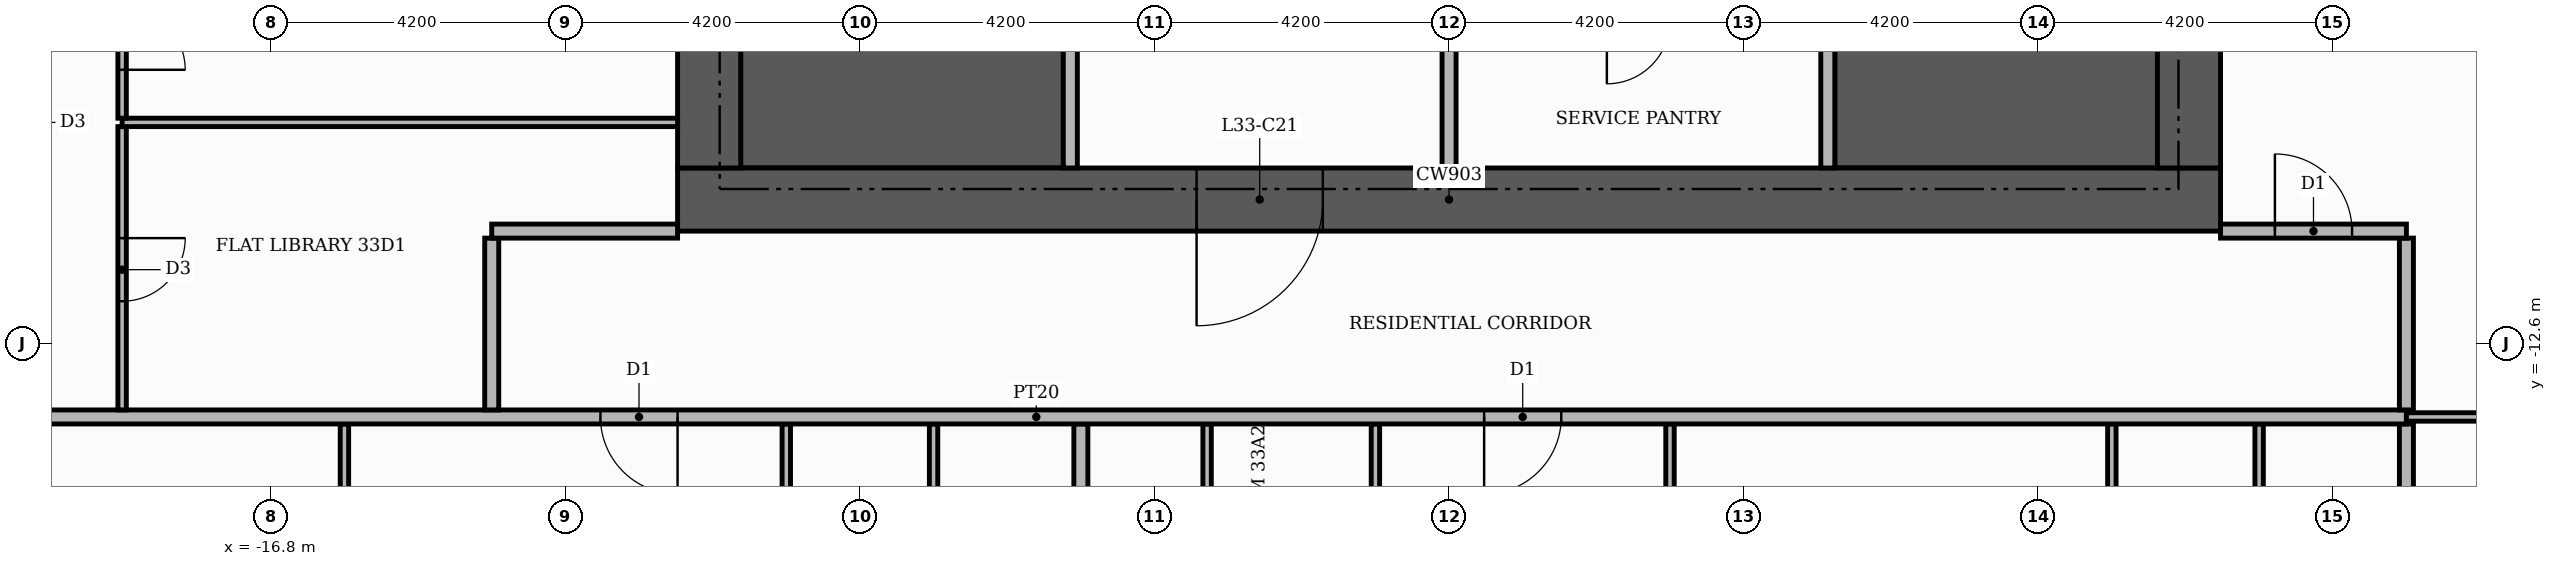
"""IFC4 building model, lengths in metres.
Left out: names, types, materials, properties, quantities, classifications, styles, units other than length and angle.
Written with IfcOpenShell. Run it as: python <this file> out.ifc"""

import sys

from ifc_helpers import new_model, si_unit, direction, frame, frame_2d, origin, place, context, subcontext, project, spatial, rectangle, extrude, element, fill, save


model = new_model("IFC4")
c1 = context("Model", 3, precision=1e-05, world=origin(), true_north=direction((0.0, 1.0)))
c2 = subcontext(c1, "Body", "Model", "MODEL_VIEW")
j1 = project(units=[si_unit("LENGTHUNIT", "METRE"), si_unit("PLANEANGLEUNIT", "RADIAN")], contexts=[c1])
p1 = place(None, origin())
s1 = spatial("IfcSite", under=j1, at=p1, CompositionType="ELEMENT")
p2 = place(p1, origin())
s2 = spatial("IfcBuilding", under=s1, at=p2, CompositionType="ELEMENT")
p3 = place(p2, frame((0.0, 0.0, 141.6)))
s3 = spatial("IfcBuildingStorey", under=s2, at=p3, CompositionType="ELEMENT", Elevation=141.6)
for number, where, z_axis, x_axis in (
    (1, (-10.1, -9.15, 0.0), (0.0, 0.0, 1.0), (1.0, 0.0, 0.0)),
    (2, (5.5, -9.15, 0.0), (0.0, 0.0, 1.0), (1.0, 0.0, 0.0)),
):
    element("IfcWall", number, at=place(p3, frame(where, z_axis=z_axis, x_axis=x_axis)), inside=s3, PredefinedType="SHEAR", context=c2, shape_type="SweptSolid", body=[
        extrude(rectangle(XDim=4.6, YDim=1.9, at=frame_2d((2.3, 0.0))), origin(), (0.0, 0.0, 1.0), 3.48),
    ])
p4 = place(p3, frame((-11.0, -10.55, 0.0), z_axis=(0.0, 0.0, 1.0), x_axis=(1.0, 0.0, 0.0)))
e3 = element("IfcWall", 3, at=p4, inside=s3, PredefinedType="SHEAR", context=c2, shape_type="SweptSolid", body=[
    extrude(rectangle(XDim=22.0, YDim=0.9, at=frame_2d((11.0, 0.0))), origin(), (0.0, 0.0, 1.0), 3.48),
])
p5 = place(p4, frame((7.4, 0.0, 0.0)))
e4 = element("IfcOpeningElement", 4, at=p5, cuts=e3, PredefinedType="OPENING", context=c2, shape_type="SweptSolid", body=[
    extrude(rectangle(XDim=1.8, YDim=2.2, at=frame_2d((0.9, 1.1))), frame((0.0, 0.46, 0.0), z_axis=(0.0, -1.0, 0.0), x_axis=(1.0, 0.0, 0.0)), (0.0, 0.0, 1.0), 0.92),
])
for number, where, z_axis, x_axis in (
    (5, (-10.55, -10.1, 0.0), (0.0, 0.0, 1.0), (0.0, 1.0, 0.0)),
    (6, (10.55, -10.1, 0.0), (0.0, 0.0, 1.0), (0.0, 1.0, 0.0)),
):
    element("IfcWall", number, at=place(p3, frame(where, z_axis=z_axis, x_axis=x_axis)), inside=s3, PredefinedType="SHEAR", context=c2, shape_type="SweptSolid", body=[
        extrude(rectangle(XDim=20.2, YDim=0.9, at=frame_2d((10.1, 0.0))), origin(), (0.0, 0.0, 1.0), 3.48),
    ])
p6 = place(p3, frame((-5.4, -10.1, 0.0), z_axis=(0.0, 0.0, 1.0), x_axis=(0.0, 1.0, 0.0)))
e7 = element("IfcWall", 7, at=p6, inside=s3, PredefinedType="PARTITIONING", context=c2, shape_type="SweptSolid", body=[
    extrude(rectangle(XDim=4.6, YDim=0.2, at=frame_2d((2.3, 0.0))), origin(), (0.0, 0.0, 1.0), 3.48),
])
p7 = place(p6, frame((2.9, 0.0, 0.0)))
e8 = element("IfcOpeningElement", 8, at=p7, cuts=e7, PredefinedType="OPENING", context=c2, shape_type="SweptSolid", body=[
    extrude(rectangle(XDim=1.0, YDim=2.1, at=frame_2d((0.5, 1.05))), frame((0.0, 0.11, 0.0), z_axis=(0.0, -1.0, 0.0), x_axis=(1.0, 0.0, 0.0)), (0.0, 0.0, 1.0), 0.22),
])
p8 = place(p3, frame((0.0, -10.1, 0.0), z_axis=(0.0, 0.0, 1.0), x_axis=(0.0, 1.0, 0.0)))
e9 = element("IfcWall", 9, at=p8, inside=s3, PredefinedType="PARTITIONING", context=c2, shape_type="SweptSolid", body=[
    extrude(rectangle(XDim=2.2, YDim=0.2, at=frame_2d((1.1, 0.0))), origin(), (0.0, 0.0, 1.0), 3.48),
])
p9 = place(p3, frame((5.4, -10.1, 0.0), z_axis=(0.0, 0.0, 1.0), x_axis=(0.0, 1.0, 0.0)))
e10 = element("IfcWall", 10, at=p9, inside=s3, PredefinedType="PARTITIONING", context=c2, shape_type="SweptSolid", body=[
    extrude(rectangle(XDim=4.6, YDim=0.2, at=frame_2d((2.3, 0.0))), origin(), (0.0, 0.0, 1.0), 3.48),
])
p10 = place(p9, frame((2.9, 0.0, 0.0)))
e11 = element("IfcOpeningElement", 11, at=p10, cuts=e10, PredefinedType="OPENING", context=c2, shape_type="SweptSolid", body=[
    extrude(rectangle(XDim=1.0, YDim=2.1, at=frame_2d((0.5, 1.05))), frame((0.0, 0.11, 0.0), z_axis=(0.0, -1.0, 0.0), x_axis=(1.0, 0.0, 0.0)), (0.0, 0.0, 1.0), 0.22),
])
for number, where, z_axis, x_axis in (
    (12, (-5.25, -25.42, 0.0), (0.0, 0.0, 1.0), (0.0, 1.0, 0.0)),
    (13, (13.65, -25.42, 0.0), (0.0, 0.0, 1.0), (0.0, 1.0, 0.0)),
):
    element("IfcWall", number, at=place(p3, frame(where, z_axis=z_axis, x_axis=x_axis)), inside=s3, PredefinedType="PARTITIONING", context=c2, shape_type="SweptSolid", body=[
        extrude(rectangle(XDim=11.67, YDim=0.2, at=frame_2d((5.835, 0.0))), origin(), (0.0, 0.0, 1.0), 3.48),
    ])
p11 = place(p3, frame((-15.75, -19.76, 0.0), z_axis=(0.0, 0.0, 1.0), x_axis=(0.0, 1.0, 0.0)))
e14 = element("IfcWall", 14, at=p11, inside=s3, PredefinedType="PARTITIONING", context=c2, shape_type="SweptSolid", body=[
    extrude(rectangle(XDim=6.01, YDim=0.12, at=frame_2d((3.005, 0.0))), origin(), (0.0, 0.0, 1.0), 3.48),
])
p12 = place(p11, frame((2.525, 0.0, 0.0)))
e15 = element("IfcOpeningElement", 15, at=p12, cuts=e14, PredefinedType="OPENING", context=c2, shape_type="SweptSolid", body=[
    extrude(rectangle(XDim=1.0, YDim=2.1, at=frame_2d((0.5, 1.05))), frame((0.0, 0.07, 0.0), z_axis=(0.0, -1.0, 0.0), x_axis=(1.0, 0.0, 0.0)), (0.0, 0.0, 1.0), 0.14),
])
p13 = place(p3, frame((-3.45, -18.56, 0.0), z_axis=(0.0, 0.0, 1.0), x_axis=(0.0, 1.0, 0.0)))
e16 = element("IfcWall", 16, at=p13, inside=s3, PredefinedType="PARTITIONING", context=c2, shape_type="SweptSolid", body=[
    extrude(rectangle(XDim=4.81, YDim=0.12, at=frame_2d((2.405, 0.0))), origin(), (0.0, 0.0, 1.0), 3.48),
])
p14 = place(p3, frame((-1.05, -18.56, 0.0), z_axis=(0.0, 0.0, 1.0), x_axis=(0.0, 1.0, 0.0)))
e17 = element("IfcWall", 17, at=p14, inside=s3, PredefinedType="PARTITIONING", context=c2, shape_type="SweptSolid", body=[
    extrude(rectangle(XDim=4.81, YDim=0.12, at=frame_2d((2.405, 0.0))), origin(), (0.0, 0.0, 1.0), 3.48),
])
p15 = place(p14, frame((1.975, 0.0, 0.0)))
e18 = element("IfcOpeningElement", 18, at=p15, cuts=e17, PredefinedType="OPENING", context=c2, shape_type="SweptSolid", body=[
    extrude(rectangle(XDim=0.9, YDim=2.1, at=frame_2d((0.45, 1.05))), frame((0.0, 0.07, 0.0), z_axis=(0.0, -1.0, 0.0), x_axis=(1.0, 0.0, 0.0)), (0.0, 0.0, 1.0), 0.14),
])
for number, where, z_axis, x_axis in (
    (19, (3.15, -18.56, 0.0), (0.0, 0.0, 1.0), (0.0, 1.0, 0.0)),
    (20, (9.45, -18.56, 0.0), (0.0, 0.0, 1.0), (0.0, 1.0, 0.0)),
    (21, (11.55, -18.56, 0.0), (0.0, 0.0, 1.0), (0.0, 1.0, 0.0)),
):
    element("IfcWall", number, at=place(p3, frame(where, z_axis=z_axis, x_axis=x_axis)), inside=s3, PredefinedType="PARTITIONING", context=c2, shape_type="SweptSolid", body=[
        extrude(rectangle(XDim=4.81, YDim=0.12, at=frame_2d((2.405, 0.0))), origin(), (0.0, 0.0, 1.0), 3.48),
    ])
p16 = place(p3, frame((-9.45, -18.26, 0.0), z_axis=(0.0, 0.0, 1.0), x_axis=(0.0, 1.0, 0.0)))
e22 = element("IfcWall", 22, at=p16, inside=s3, PredefinedType="PARTITIONING", context=c2, shape_type="SweptSolid", body=[
    extrude(rectangle(XDim=4.51, YDim=0.12, at=frame_2d((2.255, 0.0))), origin(), (0.0, 0.0, 1.0), 3.48),
])
p17 = place(p16, frame((1.825, 0.0, 0.0)))
e23 = element("IfcOpeningElement", 23, at=p17, cuts=e22, PredefinedType="OPENING", context=c2, shape_type="SweptSolid", body=[
    extrude(rectangle(XDim=0.9, YDim=2.1, at=frame_2d((0.45, 1.05))), frame((0.0, 0.07, 0.0), z_axis=(0.0, -1.0, 0.0), x_axis=(1.0, 0.0, 0.0)), (0.0, 0.0, 1.0), 0.14),
])
p18 = place(p3, frame((-7.35, -18.26, 0.0), z_axis=(0.0, 0.0, 1.0), x_axis=(0.0, 1.0, 0.0)))
e24 = element("IfcWall", 24, at=p18, inside=s3, PredefinedType="PARTITIONING", context=c2, shape_type="SweptSolid", body=[
    extrude(rectangle(XDim=4.51, YDim=0.12, at=frame_2d((2.255, 0.0))), origin(), (0.0, 0.0, 1.0), 3.48),
])
p19 = place(p3, frame((-25.42, -13.65, 0.0), z_axis=(0.0, 0.0, 1.0), x_axis=(1.0, 0.0, 0.0)))
e25 = element("IfcWall", 25, at=p19, inside=s3, PredefinedType="PARTITIONING", context=c2, shape_type="SweptSolid", body=[
    extrude(rectangle(XDim=39.07, YDim=0.2, at=frame_2d((19.535, 0.0))), origin(), (0.0, 0.0, 1.0), 3.48),
])
p20 = place(p19, frame((13.32, 0.0, 0.0)))
e26 = element("IfcOpeningElement", 26, at=p20, cuts=e25, PredefinedType="OPENING", context=c2, shape_type="SweptSolid", body=[
    extrude(rectangle(XDim=1.1, YDim=2.4, at=frame_2d((0.55, 1.2))), frame((0.0, 0.11, 0.0), z_axis=(0.0, -1.0, 0.0), x_axis=(1.0, 0.0, 0.0)), (0.0, 0.0, 1.0), 0.22),
])
p21 = place(p19, frame((25.92, 0.0, 0.0)))
e27 = element("IfcOpeningElement", 27, at=p21, cuts=e25, PredefinedType="OPENING", context=c2, shape_type="SweptSolid", body=[
    extrude(rectangle(XDim=1.1, YDim=2.4, at=frame_2d((0.55, 1.2))), frame((0.0, 0.11, 0.0), z_axis=(0.0, -1.0, 0.0), x_axis=(1.0, 0.0, 0.0)), (0.0, 0.0, 1.0), 0.22),
])
p22 = place(p3, frame((13.65, -13.65, 0.0), z_axis=(0.0, 0.0, 1.0), x_axis=(1.0, 0.0, 0.0)))
e28 = element("IfcWall", 28, at=p22, inside=s3, PredefinedType="PARTITIONING", context=c2, shape_type="SweptSolid", body=[
    extrude(rectangle(XDim=6.17, YDim=0.12, at=frame_2d((3.085, 0.0))), origin(), (0.0, 0.0, 1.0), 3.48),
])
p23 = place(p22, frame((2.635, 0.0, 0.0)))
e29 = element("IfcOpeningElement", 29, at=p23, cuts=e28, PredefinedType="OPENING", context=c2, shape_type="SweptSolid", body=[
    extrude(rectangle(XDim=0.9, YDim=2.1, at=frame_2d((0.45, 1.05))), frame((0.0, 0.07, 0.0), z_axis=(0.0, -1.0, 0.0), x_axis=(1.0, 0.0, 0.0)), (0.0, 0.0, 1.0), 0.14),
])
p24 = place(p3, frame((-18.92, -13.55, 0.0), z_axis=(0.0, 0.0, 1.0), x_axis=(0.0, 1.0, 0.0)))
e30 = element("IfcWall", 30, at=p24, inside=s3, PredefinedType="PARTITIONING", context=c2, shape_type="SweptSolid", body=[
    extrude(rectangle(XDim=4.04, YDim=0.12, at=frame_2d((2.02, 0.0))), origin(), (0.0, 0.0, 1.0), 3.48),
])
p25 = place(p24, frame((1.55, 0.0, 0.0)))
e31 = element("IfcOpeningElement", 31, at=p25, cuts=e30, PredefinedType="OPENING", context=c2, shape_type="SweptSolid", body=[
    extrude(rectangle(XDim=0.9, YDim=2.1, at=frame_2d((0.45, 1.05))), frame((0.0, 0.07, 0.0), z_axis=(0.0, -1.0, 0.0), x_axis=(1.0, 0.0, 0.0)), (0.0, 0.0, 1.0), 0.14),
])
for number, where, z_axis, x_axis in (
    (32, (-13.65, -13.55, 0.0), (0.0, 0.0, 1.0), (0.0, 1.0, 0.0)),
    (33, (13.65, -13.55, 0.0), (0.0, 0.0, 1.0), (0.0, 1.0, 0.0)),
):
    element("IfcWall", number, at=place(p3, frame(where, z_axis=z_axis, x_axis=x_axis)), inside=s3, PredefinedType="PARTITIONING", context=c2, shape_type="SweptSolid", body=[
        extrude(rectangle(XDim=2.45, YDim=0.2, at=frame_2d((1.225, 0.0))), origin(), (0.0, 0.0, 1.0), 3.48),
    ])
p26 = place(p3, frame((-13.65, -11.0, 0.0), z_axis=(0.0, 0.0, 1.0), x_axis=(1.0, 0.0, 0.0)))
e34 = element("IfcWall", 34, at=p26, inside=s3, PredefinedType="PARTITIONING", context=c2, shape_type="SweptSolid", body=[
    extrude(rectangle(XDim=2.65, YDim=0.2, at=frame_2d((1.325, 0.0))), origin(), (0.0, 0.0, 1.0), 3.48),
])
p27 = place(p3, frame((11.0, -11.0, 0.0), z_axis=(0.0, 0.0, 1.0), x_axis=(1.0, 0.0, 0.0)))
e35 = element("IfcWall", 35, at=p27, inside=s3, PredefinedType="PARTITIONING", context=c2, shape_type="SweptSolid", body=[
    extrude(rectangle(XDim=2.65, YDim=0.2, at=frame_2d((1.325, 0.0))), origin(), (0.0, 0.0, 1.0), 3.48),
])
p28 = place(p27, frame((0.775, 0.0, 0.0)))
e36 = element("IfcOpeningElement", 36, at=p28, cuts=e35, PredefinedType="OPENING", context=c2, shape_type="SweptSolid", body=[
    extrude(rectangle(XDim=1.1, YDim=2.4, at=frame_2d((0.55, 1.2))), frame((0.0, 0.11, 0.0), z_axis=(0.0, -1.0, 0.0), x_axis=(1.0, 0.0, 0.0)), (0.0, 0.0, 1.0), 0.22),
])
p29 = place(p3, frame((-18.92, -9.45, 0.0), z_axis=(0.0, 0.0, 1.0), x_axis=(1.0, 0.0, 0.0)))
e37 = element("IfcWall", 37, at=p29, inside=s3, PredefinedType="PARTITIONING", context=c2, shape_type="SweptSolid", body=[
    extrude(rectangle(XDim=7.92, YDim=0.12, at=frame_2d((3.96, 0.0))), origin(), (0.0, 0.0, 1.0), 3.48),
])
p30 = place(p3, frame((-18.92, -9.39, 0.0), z_axis=(0.0, 0.0, 1.0), x_axis=(0.0, 1.0, 0.0)))
e38 = element("IfcWall", 38, at=p30, inside=s3, PredefinedType="PARTITIONING", context=c2, shape_type="SweptSolid", body=[
    extrude(rectangle(XDim=2.28, YDim=0.12, at=frame_2d((1.14, 0.0))), origin(), (0.0, 0.0, 1.0), 3.48),
])
p31 = place(p30, frame((0.69, 0.0, 0.0)))
e39 = element("IfcOpeningElement", 39, at=p31, cuts=e38, PredefinedType="OPENING", context=c2, shape_type="SweptSolid", body=[
    extrude(rectangle(XDim=0.9, YDim=2.1, at=frame_2d((0.45, 1.05))), frame((0.0, 0.07, 0.0), z_axis=(0.0, -1.0, 0.0), x_axis=(1.0, 0.0, 0.0)), (0.0, 0.0, 1.0), 0.14),
])
p32 = place(p5, frame((1.8, 0.0, 0.0), z_axis=(0.0, 0.0, 1.0), x_axis=(-1.0, 0.0, 0.0)))
e40 = element("IfcDoor", 40, at=p32, inside=s3, OperationType="DOUBLE_DOOR_SINGLE_SWING", PredefinedType="DOOR", context=c2, shape_type="SweptSolid", body=[
    extrude(rectangle(XDim=1.8, YDim=2.2, at=frame_2d((0.9, 1.1))), frame((0.0, 0.025, 0.0), z_axis=(0.0, -1.0, 0.0), x_axis=(1.0, 0.0, 0.0)), (0.0, 0.0, 1.0), 0.05),
])
fill(e4, e40)
p33 = place(p20, frame((1.1, 0.0, 0.0), z_axis=(0.0, 0.0, 1.0), x_axis=(-1.0, 0.0, 0.0)))
e41 = element("IfcDoor", 41, at=p33, inside=s3, OperationType="SINGLE_SWING_RIGHT", PredefinedType="DOOR", context=c2, shape_type="SweptSolid", body=[
    extrude(rectangle(XDim=1.1, YDim=2.4, at=frame_2d((0.55, 1.2))), frame((0.0, 0.025, 0.0), z_axis=(0.0, -1.0, 0.0), x_axis=(1.0, 0.0, 0.0)), (0.0, 0.0, 1.0), 0.05),
])
fill(e26, e41)
p34 = place(p21, frame((1.1, 0.0, 0.0), z_axis=(0.0, 0.0, 1.0), x_axis=(-1.0, 0.0, 0.0)))
e42 = element("IfcDoor", 42, at=p34, inside=s3, OperationType="SINGLE_SWING_LEFT", PredefinedType="DOOR", context=c2, shape_type="SweptSolid", body=[
    extrude(rectangle(XDim=1.1, YDim=2.4, at=frame_2d((0.55, 1.2))), frame((0.0, 0.025, 0.0), z_axis=(0.0, -1.0, 0.0), x_axis=(1.0, 0.0, 0.0)), (0.0, 0.0, 1.0), 0.05),
])
fill(e27, e42)
p35 = place(p28, origin())
e43 = element("IfcDoor", 43, at=p35, inside=s3, OperationType="SINGLE_SWING_LEFT", PredefinedType="DOOR", context=c2, shape_type="SweptSolid", body=[
    extrude(rectangle(XDim=1.1, YDim=2.4, at=frame_2d((0.55, 1.2))), frame((0.0, 0.025, 0.0), z_axis=(0.0, -1.0, 0.0), x_axis=(1.0, 0.0, 0.0)), (0.0, 0.0, 1.0), 0.05),
])
fill(e36, e43)
p36 = place(p31, frame((0.9, 0.0, 0.0), z_axis=(0.0, 0.0, 1.0), x_axis=(-1.0, 0.0, 0.0)))
e44 = element("IfcDoor", 44, at=p36, inside=s3, OperationType="SINGLE_SWING_LEFT", PredefinedType="DOOR", context=c2, shape_type="SweptSolid", body=[
    extrude(rectangle(XDim=0.9, YDim=2.1, at=frame_2d((0.45, 1.05))), frame((0.0, 0.025, 0.0), z_axis=(0.0, -1.0, 0.0), x_axis=(1.0, 0.0, 0.0)), (0.0, 0.0, 1.0), 0.05),
])
fill(e39, e44)
p37 = place(p25, frame((0.9, 0.0, 0.0), z_axis=(0.0, 0.0, 1.0), x_axis=(-1.0, 0.0, 0.0)))
e45 = element("IfcDoor", 45, at=p37, inside=s3, OperationType="SINGLE_SWING_RIGHT", PredefinedType="DOOR", context=c2, shape_type="SweptSolid", body=[
    extrude(rectangle(XDim=0.9, YDim=2.1, at=frame_2d((0.45, 1.05))), frame((0.0, 0.025, 0.0), z_axis=(0.0, -1.0, 0.0), x_axis=(1.0, 0.0, 0.0)), (0.0, 0.0, 1.0), 0.05),
])
fill(e31, e45)
save(model, sys.argv[1])
